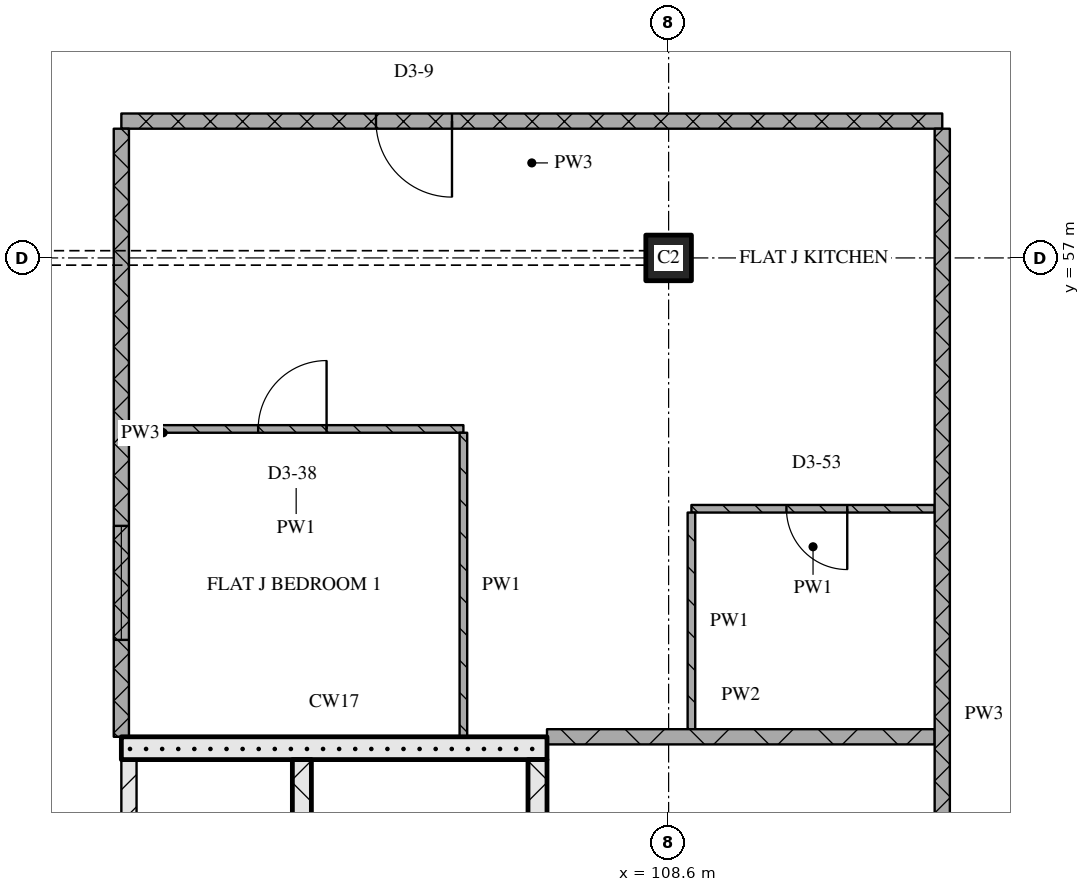
"""IFC4 building model, lengths in metres.
Left out: names, types, materials, properties, quantities, classifications, styles, units other than length and angle.
Written with IfcOpenShell. Run it as: python <this file> out.ifc"""

import sys

from ifc_helpers import new_model, si_unit, direction, frame, frame_2d, origin, origin_2d, place, context, subcontext, project, spatial, rectangle, extrude, element, fill, save


model = new_model("IFC4")
c1 = context("Model", 3, precision=1e-05, world=origin(), true_north=direction((0.0, 1.0)))
c2 = subcontext(c1, "Body", "Model", "MODEL_VIEW")
j1 = project(units=[si_unit("LENGTHUNIT", "METRE"), si_unit("PLANEANGLEUNIT", "RADIAN")], contexts=[c1])
p1 = place(None, origin())
s1 = spatial("IfcSite", under=j1, at=p1, CompositionType="ELEMENT")
p2 = place(p1, origin())
s2 = spatial("IfcBuilding", under=s1, at=p2, CompositionType="ELEMENT")
p3 = place(p2, frame((0.0, 0.0, 230.7)))
s3 = spatial("IfcBuildingStorey", under=s2, at=p3, CompositionType="ELEMENT", Elevation=230.7)
p4 = place(p3, frame((108.6, 57.0, 0.0), z_axis=(0.0, 0.0, 1.0), x_axis=(1.0, 0.0, 0.0)))
e1 = element("IfcColumn", 1, at=p4, inside=s3, PredefinedType="COLUMN", context=c2, shape_type="SweptSolid", body=[
    extrude(rectangle(XDim=0.6, YDim=0.6, at=origin_2d()), origin(), (0.0, 0.0, 1.0), 3.6),
])
p5 = place(p3, frame((101.5, 43.5, 0.0), z_axis=(0.0, 0.0, 1.0), x_axis=(0.0, 1.0, 0.0)))
e2 = element("IfcWall", 2, at=p5, inside=s3, PredefinedType="PARTITIONING", context=c2, shape_type="SweptSolid", body=[
    extrude(rectangle(XDim=6.9, YDim=0.2, at=frame_2d((3.45, 0.0))), origin(), (0.0, 0.0, 1.0), 3.32),
])
p6 = place(p5, frame((1.0, 0.0, 0.0)))
e3 = element("IfcOpeningElement", 3, at=p6, cuts=e2, PredefinedType="OPENING", context=c2, shape_type="SweptSolid", body=[
    extrude(rectangle(XDim=1.0, YDim=2.1, at=frame_2d((0.5, 1.05))), frame((0.0, 0.11, 0.0), z_axis=(0.0, -1.0, 0.0), x_axis=(1.0, 0.0, 0.0)), (0.0, 0.0, 1.0), 0.22),
])
p7 = place(p3, frame((103.775, 43.5, 0.0), z_axis=(0.0, 0.0, 1.0), x_axis=(0.0, 1.0, 0.0)))
e4 = element("IfcWall", 4, at=p7, inside=s3, PredefinedType="SOLIDWALL", context=c2, shape_type="SweptSolid", body=[
    extrude(rectangle(XDim=6.9, YDim=0.25, at=frame_2d((3.45, 0.0))), origin(), (0.0, 0.0, 1.0), 3.32),
])
p8 = place(p7, frame((0.2, 0.0, 0.0)))
e5 = element("IfcOpeningElement", 5, at=p8, cuts=e4, PredefinedType="OPENING", context=c2, shape_type="SweptSolid", body=[
    extrude(rectangle(XDim=1.0, YDim=2.1, at=frame_2d((0.5, 1.05))), frame((0.0, 0.135, 0.0), z_axis=(0.0, -1.0, 0.0), x_axis=(1.0, 0.0, 0.0)), (0.0, 0.0, 1.0), 0.27),
])
p9 = place(p3, frame((106.875, 43.5, 0.0), z_axis=(0.0, 0.0, 1.0), x_axis=(0.0, 1.0, 0.0)))
e6 = element("IfcWall", 6, at=p9, inside=s3, PredefinedType="SOLIDWALL", context=c2, shape_type="SweptSolid", body=[
    extrude(rectangle(XDim=6.9, YDim=0.25, at=frame_2d((3.45, 0.0))), origin(), (0.0, 0.0, 1.0), 3.32),
])
p10 = place(p3, frame((101.4, 50.55, 0.0), z_axis=(0.0, 0.0, 1.0), x_axis=(1.0, 0.0, 0.0)))
e7 = element("IfcWall", 7, at=p10, inside=s3, PredefinedType="SOLIDWALL", context=c2, shape_type="SweptSolid", body=[
    extrude(rectangle(XDim=5.6, YDim=0.3, at=frame_2d((2.8, 0.0))), origin(), (0.0, 0.0, 1.0), 3.32),
])
p11 = place(p3, frame((107.0, 50.7, 0.0), z_axis=(0.0, 0.0, 1.0), x_axis=(1.0, 0.0, 0.0)))
e8 = element("IfcWall", 8, at=p11, inside=s3, PredefinedType="PARTITIONING", context=c2, shape_type="SweptSolid", body=[
    extrude(rectangle(XDim=5.1, YDim=0.2, at=frame_2d((2.55, 0.0))), origin(), (0.0, 0.0, 1.0), 3.32),
])
p12 = place(p3, frame((112.1, 53.7, 0.0), z_axis=(0.0, 0.0, 1.0), x_axis=(-1.0, 0.0, 0.0)))
e9 = element("IfcWall", 9, at=p12, inside=s3, PredefinedType="PARTITIONING", context=c2, shape_type="SweptSolid", body=[
    extrude(rectangle(XDim=3.2, YDim=0.1, at=frame_2d((1.6, 0.0))), origin(), (0.0, 0.0, 1.0), 3.32),
])
p13 = place(p12, frame((1.15, 0.0, 0.0)))
e10 = element("IfcOpeningElement", 10, at=p13, cuts=e9, PredefinedType="OPENING", context=c2, shape_type="SweptSolid", body=[
    extrude(rectangle(XDim=0.8, YDim=2.1, at=frame_2d((0.4, 1.05))), frame((0.0, 0.06, 0.0), z_axis=(0.0, -1.0, 0.0), x_axis=(1.0, 0.0, 0.0)), (0.0, 0.0, 1.0), 0.12),
])
p14 = place(p3, frame((105.9, 54.75, 0.0), z_axis=(0.0, 0.0, 1.0), x_axis=(-1.0, 0.0, 0.0)))
e11 = element("IfcWall", 11, at=p14, inside=s3, PredefinedType="PARTITIONING", context=c2, shape_type="SweptSolid", body=[
    extrude(rectangle(XDim=4.4, YDim=0.1, at=frame_2d((2.2, 0.0))), origin(), (0.0, 0.0, 1.0), 3.32),
])
p15 = place(p14, frame((1.8, 0.0, 0.0)))
e12 = element("IfcOpeningElement", 12, at=p15, cuts=e11, PredefinedType="OPENING", context=c2, shape_type="SweptSolid", body=[
    extrude(rectangle(XDim=0.9, YDim=2.1, at=frame_2d((0.45, 1.05))), frame((0.0, 0.06, 0.0), z_axis=(0.0, -1.0, 0.0), x_axis=(1.0, 0.0, 0.0)), (0.0, 0.0, 1.0), 0.12),
])
p16 = place(p3, frame((112.2, 58.8, 0.0), z_axis=(0.0, 0.0, 1.0), x_axis=(-1.0, 0.0, 0.0)))
e13 = element("IfcWall", 13, at=p16, inside=s3, PredefinedType="PARTITIONING", context=c2, shape_type="SweptSolid", body=[
    extrude(rectangle(XDim=10.8, YDim=0.2, at=frame_2d((5.4, 0.0))), origin(), (0.0, 0.0, 1.0), 3.32),
])
p17 = place(p16, frame((6.45, 0.0, 0.0)))
e14 = element("IfcOpeningElement", 14, at=p17, cuts=e13, PredefinedType="OPENING", context=c2, shape_type="SweptSolid", body=[
    extrude(rectangle(XDim=1.0, YDim=2.1, at=frame_2d((0.5, 1.05))), frame((0.0, 0.11, 0.0), z_axis=(0.0, -1.0, 0.0), x_axis=(1.0, 0.0, 0.0)), (0.0, 0.0, 1.0), 0.22),
])
p18 = place(p3, frame((101.4, 58.7, 0.0), z_axis=(0.0, 0.0, 1.0), x_axis=(0.0, -1.0, 0.0)))
e15 = element("IfcWall", 15, at=p18, inside=s3, PredefinedType="PARTITIONING", context=c2, shape_type="SweptSolid", body=[
    extrude(rectangle(XDim=8.0, YDim=0.2, at=frame_2d((4.0, 0.0))), origin(), (0.0, 0.0, 1.0), 3.32),
])
p19 = place(p18, frame((5.225, 0.0, 0.9)))
e16 = element("IfcOpeningElement", 16, at=p19, cuts=e15, PredefinedType="OPENING", context=c2, shape_type="SweptSolid", body=[
    extrude(rectangle(XDim=1.5, YDim=1.5, at=frame_2d((0.75, 0.75))), frame((0.0, 0.11, 0.0), z_axis=(0.0, -1.0, 0.0), x_axis=(1.0, 0.0, 0.0)), (0.0, 0.0, 1.0), 0.22),
])
p20 = place(p3, frame((105.9, 54.7, 0.0), z_axis=(0.0, 0.0, 1.0), x_axis=(0.0, -1.0, 0.0)))
e17 = element("IfcWall", 17, at=p20, inside=s3, PredefinedType="PARTITIONING", context=c2, shape_type="SweptSolid", body=[
    extrude(rectangle(XDim=4.0, YDim=0.1, at=frame_2d((2.0, 0.0))), origin(), (0.0, 0.0, 1.0), 3.32),
])
p21 = place(p3, frame((108.9, 53.65, 0.0), z_axis=(0.0, 0.0, 1.0), x_axis=(0.0, -1.0, 0.0)))
e18 = element("IfcWall", 18, at=p21, inside=s3, PredefinedType="PARTITIONING", context=c2, shape_type="SweptSolid", body=[
    extrude(rectangle(XDim=2.85, YDim=0.1, at=frame_2d((1.425, 0.0))), origin(), (0.0, 0.0, 1.0), 3.32),
])
p22 = place(p3, frame((112.2, 58.7, 0.0), z_axis=(0.0, 0.0, 1.0), x_axis=(0.0, -1.0, 0.0)))
e19 = element("IfcWall", 19, at=p22, inside=s3, PredefinedType="PARTITIONING", context=c2, shape_type="SweptSolid", body=[
    extrude(rectangle(XDim=15.4, YDim=0.2, at=frame_2d((7.7, 0.0))), origin(), (0.0, 0.0, 1.0), 3.32),
])
p23 = place(p13, origin())
e20 = element("IfcDoor", 20, at=p23, inside=s3, OperationType="SINGLE_SWING_LEFT", PredefinedType="DOOR", context=c2, shape_type="SweptSolid", body=[
    extrude(rectangle(XDim=0.8, YDim=2.1, at=frame_2d((0.4, 1.05))), frame((0.0, 0.025, 0.0), z_axis=(0.0, -1.0, 0.0), x_axis=(1.0, 0.0, 0.0)), (0.0, 0.0, 1.0), 0.05),
])
fill(e10, e20)
p24 = place(p15, origin())
e21 = element("IfcDoor", 21, at=p24, inside=s3, OperationType="SINGLE_SWING_RIGHT", PredefinedType="DOOR", context=c2, shape_type="SweptSolid", body=[
    extrude(rectangle(XDim=0.9, YDim=2.1, at=frame_2d((0.45, 1.05))), frame((0.0, 0.025, 0.0), z_axis=(0.0, -1.0, 0.0), x_axis=(1.0, 0.0, 0.0)), (0.0, 0.0, 1.0), 0.05),
])
fill(e12, e21)
p25 = place(p17, origin())
e22 = element("IfcDoor", 22, at=p25, inside=s3, OperationType="SINGLE_SWING_LEFT", PredefinedType="DOOR", context=c2, shape_type="SweptSolid", body=[
    extrude(rectangle(XDim=1.0, YDim=2.1, at=frame_2d((0.5, 1.05))), frame((0.0, 0.025, 0.0), z_axis=(0.0, -1.0, 0.0), x_axis=(1.0, 0.0, 0.0)), (0.0, 0.0, 1.0), 0.05),
])
fill(e14, e22)
p26 = place(p19, origin())
e23 = element("IfcWindow", 23, at=p26, inside=s3, PartitioningType="SINGLE_PANEL", PredefinedType="WINDOW", context=c2, shape_type="SweptSolid", body=[
    extrude(rectangle(XDim=1.5, YDim=1.5, at=frame_2d((0.75, 0.75))), frame((0.0, 0.03, 0.0), z_axis=(0.0, -1.0, 0.0), x_axis=(1.0, 0.0, 0.0)), (0.0, 0.0, 1.0), 0.06),
])
fill(e16, e23)
save(model, sys.argv[1])
